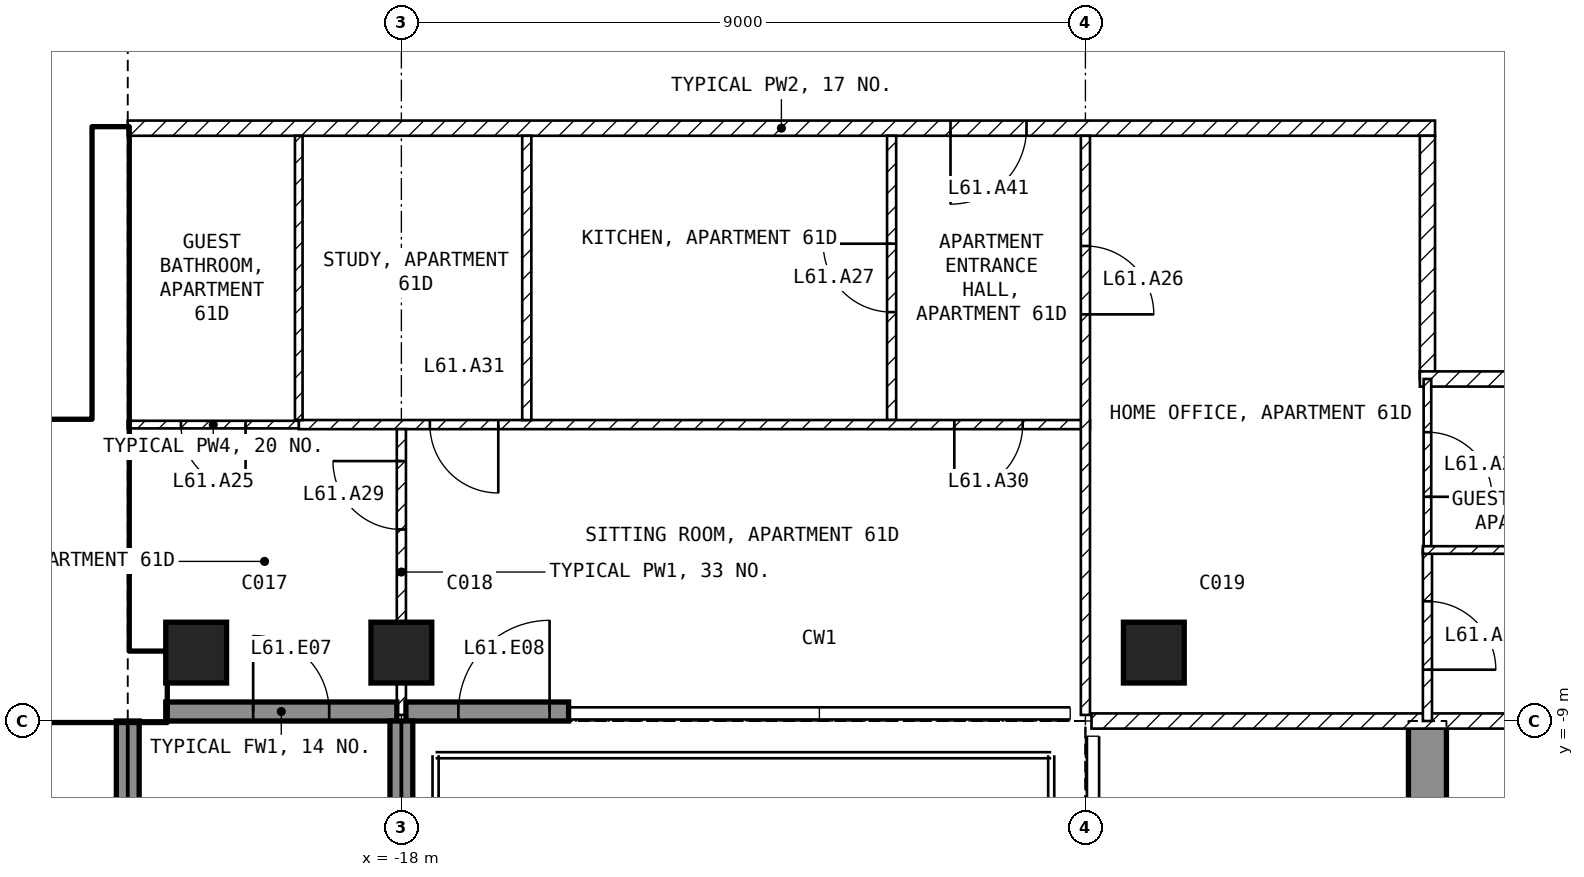
"""IFC4 building model, lengths in metres.
Left out: names, types, materials, properties, quantities, classifications, styles, units other than length and angle.
Written with IfcOpenShell. Run it as: python <this file> out.ifc"""

import sys

from ifc_helpers import new_model, si_unit, direction, frame, frame_2d, origin, origin_2d, place, context, subcontext, project, spatial, polyline, rectangle, outline, extrude, element, fill, save


model = new_model("IFC4")
c1 = context("Model", 3, precision=1e-05, world=origin(), true_north=direction((0.0, 1.0)))
c2 = subcontext(c1, "Body", "Model", "MODEL_VIEW")
j1 = project(units=[si_unit("LENGTHUNIT", "METRE"), si_unit("PLANEANGLEUNIT", "RADIAN")], contexts=[c1])
p1 = place(None, origin())
s1 = spatial("IfcSite", under=j1, at=p1, CompositionType="ELEMENT")
p2 = place(p1, origin())
s2 = spatial("IfcBuilding", under=s1, at=p2, CompositionType="ELEMENT")
p3 = place(p2, frame((0.0, 0.0, 243.0)))
s3 = spatial("IfcBuildingStorey", under=s2, at=p3, CompositionType="ELEMENT", Elevation=243.0)
for number, where, z_axis, x_axis in (
    (1, (-20.7, -8.1, -0.25), (0.0, 0.0, 1.0), (1.0, 0.0, 0.0)),
    (2, (-18.0, -8.1, -0.25), (0.0, 0.0, 1.0), (1.0, 0.0, 0.0)),
    (3, (-8.1, -8.1, -0.25), (0.0, 0.0, 1.0), (1.0, 0.0, 0.0)),
):
    element("IfcColumn", number, at=place(p3, frame(where, z_axis=z_axis, x_axis=x_axis)), inside=s3, PredefinedType="COLUMN", context=c2, shape_type="SweptSolid", body=[
        extrude(rectangle(XDim=0.8, YDim=0.8, at=origin_2d()), origin(), (0.0, 0.0, 1.0), 3.5),
    ])
p4 = place(p3, frame((-4.75, -16.7, -0.25), z_axis=(1.0, 0.0, 0.0), x_axis=(0.0, 1.0, 0.0)))
e4 = element("IfcWall", 4, at=p4, inside=s3, PredefinedType="SHEAR", context=c2, shape_type="SweptSolid", body=[
    extrude(outline(polyline([(0.0, 0.0), (3.2, 0.0), (3.2, 2.65), (5.6, 2.65), (5.6, 0.0), (7.7, 0.0), (7.7, 3.5), (0.0, 3.5), (0.0, 0.0)])), origin(), (0.0, 0.0, 1.0), 0.5),
])
p5 = place(p3, frame((-21.1, -8.875, 0.0), z_axis=(0.0, 0.0, 1.0), x_axis=(1.0, 0.0, 0.0)))
e5 = element("IfcWall", 5, at=p5, inside=s3, PredefinedType="SOLIDWALL", context=c2, shape_type="SweptSolid", body=[
    extrude(rectangle(XDim=3.04, YDim=0.25, at=frame_2d((1.52, 0.0))), origin(), (0.0, 0.0, 1.0), 3.25),
])
p6 = place(p5, frame((1.15, 0.0, 0.0)))
e6 = element("IfcOpeningElement", 6, at=p6, cuts=e5, PredefinedType="OPENING", context=c2, shape_type="SweptSolid", body=[
    extrude(rectangle(XDim=1.0, YDim=2.4, at=frame_2d((0.5, 1.2))), frame((0.0, 0.135, 0.0), z_axis=(0.0, -1.0, 0.0), x_axis=(1.0, 0.0, 0.0)), (0.0, 0.0, 1.0), 0.27),
])
p7 = place(p3, frame((-17.94, -8.875, 0.0), z_axis=(0.0, 0.0, 1.0), x_axis=(1.0, 0.0, 0.0)))
e7 = element("IfcWall", 7, at=p7, inside=s3, PredefinedType="SOLIDWALL", context=c2, shape_type="SweptSolid", body=[
    extrude(rectangle(XDim=2.14, YDim=0.25, at=frame_2d((1.07, 0.0))), origin(), (0.0, 0.0, 1.0), 3.25),
])
p8 = place(p7, frame((0.69, 0.0, 0.0)))
e8 = element("IfcOpeningElement", 8, at=p8, cuts=e7, PredefinedType="OPENING", context=c2, shape_type="SweptSolid", body=[
    extrude(rectangle(XDim=1.2, YDim=2.4, at=frame_2d((0.6, 1.2))), frame((0.0, 0.135, 0.0), z_axis=(0.0, -1.0, 0.0), x_axis=(1.0, 0.0, 0.0)), (0.0, 0.0, 1.0), 0.27),
])
p9 = place(p3, frame((-21.6, -9.0, 0.0), z_axis=(0.0, 0.0, 1.0), x_axis=(0.0, -1.0, 0.0)))
e9 = element("IfcWall", 9, at=p9, inside=s3, PredefinedType="SOLIDWALL", context=c2, shape_type="SweptSolid", body=[
    extrude(rectangle(XDim=2.7, YDim=0.3, at=frame_2d((1.35, 0.0))), origin(), (0.0, 0.0, 1.0), 3.25),
])
p10 = place(p3, frame((-18.0, -9.0, 0.0), z_axis=(0.0, 0.0, 1.0), x_axis=(0.0, -1.0, 0.0)))
e10 = element("IfcWall", 10, at=p10, inside=s3, PredefinedType="SOLIDWALL", context=c2, shape_type="SweptSolid", body=[
    extrude(rectangle(XDim=2.74, YDim=0.3, at=frame_2d((1.37, 0.0))), origin(), (0.0, 0.0, 1.0), 3.25),
])
p11 = place(p3, frame((-30.2, -8.55, 0.0), z_axis=(0.0, 0.0, 1.0), x_axis=(1.0, 0.0, 0.0)))
e11 = element("IfcWall", 11, at=p11, inside=s3, PredefinedType="SHEAR", context=c2, shape_type="SweptSolid", body=[
    extrude(rectangle(XDim=9.1, YDim=0.9, at=frame_2d((4.55, 0.0))), origin(), (0.0, 0.0, 1.0), 3.25),
])
p12 = place(p3, frame((-21.825, -8.1, 0.0), z_axis=(0.0, 0.0, 1.0), x_axis=(0.0, 1.0, 0.0)))
e12 = element("IfcWall", 12, at=p12, inside=s3, PredefinedType="SHEAR", context=c2, shape_type="SweptSolid", body=[
    extrude(rectangle(XDim=6.9, YDim=0.45, at=frame_2d((3.45, 0.0))), origin(), (0.0, 0.0, 1.0), 3.25),
])
p13 = place(p3, frame((-28.35, -5.15, 0.0), z_axis=(0.0, 0.0, 1.0), x_axis=(1.0, 0.0, 0.0)))
e13 = element("IfcWall", 13, at=p13, inside=s3, PredefinedType="SOLIDWALL", context=c2, shape_type="SweptSolid", body=[
    extrude(rectangle(XDim=6.3, YDim=0.2, at=frame_2d((3.15, 0.0))), origin(), (0.0, 0.0, 1.0), 3.25),
])
p14 = place(p13, frame((5.1, 0.0, 0.0)))
e14 = element("IfcOpeningElement", 14, at=p14, cuts=e13, PredefinedType="OPENING", context=c2, shape_type="SweptSolid", body=[
    extrude(rectangle(XDim=1.0, YDim=2.1, at=frame_2d((0.5, 1.05))), frame((0.0, 0.11, 0.0), z_axis=(0.0, -1.0, 0.0), x_axis=(1.0, 0.0, 0.0)), (0.0, 0.0, 1.0), 0.22),
])
p15 = place(p3, frame((-4.4, -1.2, 0.0), z_axis=(0.0, 0.0, 1.0), x_axis=(-1.0, 0.0, 0.0)))
e15 = element("IfcWall", 15, at=p15, inside=s3, PredefinedType="PARTITIONING", context=c2, shape_type="SweptSolid", body=[
    extrude(rectangle(XDim=17.2, YDim=0.2, at=frame_2d((8.6, 0.0))), origin(), (0.0, 0.0, 1.0), 3.25),
])
p16 = place(p15, frame((5.375, 0.0, 0.0)))
e16 = element("IfcOpeningElement", 16, at=p16, cuts=e15, PredefinedType="OPENING", context=c2, shape_type="SweptSolid", body=[
    extrude(rectangle(XDim=1.0, YDim=2.1, at=frame_2d((0.5, 1.05))), frame((0.0, 0.11, 0.0), z_axis=(0.0, -1.0, 0.0), x_axis=(1.0, 0.0, 0.0)), (0.0, 0.0, 1.0), 0.22),
])
p17 = place(p3, frame((-4.5, -4.5, 0.0), z_axis=(0.0, 0.0, 1.0), x_axis=(0.0, 1.0, 0.0)))
e17 = element("IfcWall", 17, at=p17, inside=s3, PredefinedType="PARTITIONING", context=c2, shape_type="SweptSolid", body=[
    extrude(rectangle(XDim=3.2, YDim=0.2, at=frame_2d((1.6, 0.0))), origin(), (0.0, 0.0, 1.0), 3.25),
])
p18 = place(p3, frame((-1.1, -4.5, 0.0), z_axis=(0.0, 0.0, 1.0), x_axis=(-1.0, 0.0, 0.0)))
e18 = element("IfcWall", 18, at=p18, inside=s3, PredefinedType="PARTITIONING", context=c2, shape_type="SweptSolid", body=[
    extrude(rectangle(XDim=3.5, YDim=0.2, at=frame_2d((1.75, 0.0))), origin(), (0.0, 0.0, 1.0), 3.25),
])
p19 = place(p3, frame((8.92, -9.0, 0.0), z_axis=(0.0, 0.0, 1.0), x_axis=(-1.0, 0.0, 0.0)))
e19 = element("IfcWall", 19, at=p19, inside=s3, PredefinedType="PARTITIONING", context=c2, shape_type="SweptSolid", body=[
    extrude(rectangle(XDim=17.84, YDim=0.2, at=frame_2d((8.92, 0.0))), origin(), (0.0, 0.0, 1.0), 3.25),
])
p20 = place(p19, frame((8.42, 0.0, 0.0)))
e20 = element("IfcOpeningElement", 20, at=p20, cuts=e19, PredefinedType="OPENING", context=c2, shape_type="SweptSolid", body=[
    extrude(rectangle(XDim=1.0, YDim=2.1, at=frame_2d((0.5, 1.05))), frame((0.0, 0.11, 0.0), z_axis=(0.0, -1.0, 0.0), x_axis=(1.0, 0.0, 0.0)), (0.0, 0.0, 1.0), 0.22),
])
p21 = place(p3, frame((-11.55, -5.04, 0.0), z_axis=(0.0, 0.0, 1.0), x_axis=(0.0, 1.0, 0.0)))
e21 = element("IfcWall", 21, at=p21, inside=s3, PredefinedType="PARTITIONING", context=c2, shape_type="SweptSolid", body=[
    extrude(rectangle(XDim=3.74, YDim=0.12, at=frame_2d((1.87, 0.0))), origin(), (0.0, 0.0, 1.0), 3.25),
])
p22 = place(p21, frame((1.42, 0.0, 0.0)))
e22 = element("IfcOpeningElement", 22, at=p22, cuts=e21, PredefinedType="OPENING", context=c2, shape_type="SweptSolid", body=[
    extrude(rectangle(XDim=0.9, YDim=2.1, at=frame_2d((0.45, 1.05))), frame((0.0, 0.07, 0.0), z_axis=(0.0, -1.0, 0.0), x_axis=(1.0, 0.0, 0.0)), (0.0, 0.0, 1.0), 0.14),
])
p23 = place(p3, frame((-8.94, -5.1, 0.0), z_axis=(0.0, 0.0, 1.0), x_axis=(-1.0, 0.0, 0.0)))
e23 = element("IfcWall", 23, at=p23, inside=s3, PredefinedType="PARTITIONING", context=c2, shape_type="SweptSolid", body=[
    extrude(rectangle(XDim=10.41, YDim=0.12, at=frame_2d((5.205, 0.0))), origin(), (0.0, 0.0, 1.0), 3.25),
])
p24 = place(p23, frame((0.885, 0.0, 0.0)))
e24 = element("IfcOpeningElement", 24, at=p24, cuts=e23, PredefinedType="OPENING", context=c2, shape_type="SweptSolid", body=[
    extrude(rectangle(XDim=0.9, YDim=2.1, at=frame_2d((0.45, 1.05))), frame((0.0, 0.07, 0.0), z_axis=(0.0, -1.0, 0.0), x_axis=(1.0, 0.0, 0.0)), (0.0, 0.0, 1.0), 0.14),
])
p25 = place(p23, frame((7.785, 0.0, 0.0)))
e25 = element("IfcOpeningElement", 25, at=p25, cuts=e23, PredefinedType="OPENING", context=c2, shape_type="SweptSolid", body=[
    extrude(rectangle(XDim=0.9, YDim=2.1, at=frame_2d((0.45, 1.05))), frame((0.0, 0.07, 0.0), z_axis=(0.0, -1.0, 0.0), x_axis=(1.0, 0.0, 0.0)), (0.0, 0.0, 1.0), 0.14),
])
p26 = place(p3, frame((-9.0, -1.3, 0.0), z_axis=(0.0, 0.0, 1.0), x_axis=(0.0, -1.0, 0.0)))
e26 = element("IfcWall", 26, at=p26, inside=s3, PredefinedType="PARTITIONING", context=c2, shape_type="SweptSolid", body=[
    extrude(rectangle(XDim=7.62, YDim=0.12, at=frame_2d((3.81, 0.0))), origin(), (0.0, 0.0, 1.0), 3.25),
])
p27 = place(p26, frame((1.45, 0.0, 0.0)))
e27 = element("IfcOpeningElement", 27, at=p27, cuts=e26, PredefinedType="OPENING", context=c2, shape_type="SweptSolid", body=[
    extrude(rectangle(XDim=0.9, YDim=2.1, at=frame_2d((0.45, 1.05))), frame((0.0, 0.07, 0.0), z_axis=(0.0, -1.0, 0.0), x_axis=(1.0, 0.0, 0.0)), (0.0, 0.0, 1.0), 0.14),
])
p28 = place(p3, frame((-16.35, -5.04, 0.0), z_axis=(0.0, 0.0, 1.0), x_axis=(0.0, 1.0, 0.0)))
e28 = element("IfcWall", 28, at=p28, inside=s3, PredefinedType="PARTITIONING", context=c2, shape_type="SweptSolid", body=[
    extrude(rectangle(XDim=3.74, YDim=0.12, at=frame_2d((1.87, 0.0))), origin(), (0.0, 0.0, 1.0), 3.25),
])
p29 = place(p3, frame((-19.35, -5.04, 0.0), z_axis=(0.0, 0.0, 1.0), x_axis=(0.0, 1.0, 0.0)))
e29 = element("IfcWall", 29, at=p29, inside=s3, PredefinedType="PARTITIONING", context=c2, shape_type="SweptSolid", body=[
    extrude(rectangle(XDim=3.74, YDim=0.1, at=frame_2d((1.87, 0.0))), origin(), (0.0, 0.0, 1.0), 3.25),
])
p30 = place(p3, frame((-19.35, -5.1, 0.0), z_axis=(0.0, 0.0, 1.0), x_axis=(-1.0, 0.0, 0.0)))
e30 = element("IfcWall", 30, at=p30, inside=s3, PredefinedType="PARTITIONING", context=c2, shape_type="SweptSolid", body=[
    extrude(rectangle(XDim=2.25, YDim=0.1, at=frame_2d((1.125, 0.0))), origin(), (0.0, 0.0, 1.0), 3.25),
])
p31 = place(p30, frame((0.7, 0.0, 0.0)))
e31 = element("IfcOpeningElement", 31, at=p31, cuts=e30, PredefinedType="OPENING", context=c2, shape_type="SweptSolid", body=[
    extrude(rectangle(XDim=0.85, YDim=2.1, at=frame_2d((0.425, 1.05))), frame((0.0, 0.06, 0.0), z_axis=(0.0, -1.0, 0.0), x_axis=(1.0, 0.0, 0.0)), (0.0, 0.0, 1.0), 0.12),
])
p32 = place(p3, frame((-18.0, -8.92, 0.0), z_axis=(0.0, 0.0, 1.0), x_axis=(0.0, 1.0, 0.0)))
e32 = element("IfcWall", 32, at=p32, inside=s3, PredefinedType="PARTITIONING", context=c2, shape_type="SweptSolid", body=[
    extrude(rectangle(XDim=3.76, YDim=0.12, at=frame_2d((1.88, 0.0))), origin(), (0.0, 0.0, 1.0), 2.496),
])
p33 = place(p32, frame((2.44, 0.0, 0.0)))
e33 = element("IfcOpeningElement", 33, at=p33, cuts=e32, PredefinedType="OPENING", context=c2, shape_type="SweptSolid", body=[
    extrude(rectangle(XDim=0.9, YDim=2.1, at=frame_2d((0.45, 1.05))), frame((0.0, 0.07, 0.0), z_axis=(0.0, -1.0, 0.0), x_axis=(1.0, 0.0, 0.0)), (0.0, 0.0, 1.0), 0.14),
])
p34 = place(p3, frame((-4.5, -4.5, 0.0), z_axis=(0.0, 0.0, 1.0), x_axis=(0.0, -1.0, 0.0)))
e34 = element("IfcWall", 34, at=p34, inside=s3, PredefinedType="PARTITIONING", context=c2, shape_type="SweptSolid", body=[
    extrude(rectangle(XDim=2.25, YDim=0.1, at=frame_2d((1.125, 0.0))), origin(), (0.0, 0.0, 1.0), 3.25),
])
p35 = place(p34, frame((0.7, 0.0, 0.0)))
e35 = element("IfcOpeningElement", 35, at=p35, cuts=e34, PredefinedType="OPENING", context=c2, shape_type="SweptSolid", body=[
    extrude(rectangle(XDim=0.85, YDim=2.1, at=frame_2d((0.425, 1.05))), frame((0.0, 0.06, 0.0), z_axis=(0.0, -1.0, 0.0), x_axis=(1.0, 0.0, 0.0)), (0.0, 0.0, 1.0), 0.12),
])
p36 = place(p3, frame((-4.5, -6.75, 0.0), z_axis=(0.0, 0.0, 1.0), x_axis=(0.0, -1.0, 0.0)))
e36 = element("IfcWall", 36, at=p36, inside=s3, PredefinedType="PARTITIONING", context=c2, shape_type="SweptSolid", body=[
    extrude(rectangle(XDim=2.25, YDim=0.12, at=frame_2d((1.125, 0.0))), origin(), (0.0, 0.0, 1.0), 3.25),
])
p37 = place(p36, frame((0.675, 0.0, 0.0)))
e37 = element("IfcOpeningElement", 37, at=p37, cuts=e36, PredefinedType="OPENING", context=c2, shape_type="SweptSolid", body=[
    extrude(rectangle(XDim=0.9, YDim=2.1, at=frame_2d((0.45, 1.05))), frame((0.0, 0.07, 0.0), z_axis=(0.0, -1.0, 0.0), x_axis=(1.0, 0.0, 0.0)), (0.0, 0.0, 1.0), 0.14),
])
p38 = place(p3, frame((-1.1, -6.75, 0.0), z_axis=(0.0, 0.0, 1.0), x_axis=(-1.0, 0.0, 0.0)))
e38 = element("IfcWall", 38, at=p38, inside=s3, PredefinedType="PARTITIONING", context=c2, shape_type="SweptSolid", body=[
    extrude(rectangle(XDim=3.46, YDim=0.1, at=frame_2d((1.73, 0.0))), origin(), (0.0, 0.0, 1.0), 3.25),
])
p39 = place(p6, origin())
e39 = element("IfcDoor", 39, at=p39, inside=s3, OperationType="SINGLE_SWING_LEFT", PredefinedType="DOOR", context=c2, shape_type="SweptSolid", body=[
    extrude(rectangle(XDim=1.0, YDim=2.4, at=frame_2d((0.5, 1.2))), frame((0.0, 0.025, 0.0), z_axis=(0.0, -1.0, 0.0), x_axis=(1.0, 0.0, 0.0)), (0.0, 0.0, 1.0), 0.05),
])
fill(e6, e39)
p40 = place(p8, origin())
e40 = element("IfcDoor", 40, at=p40, inside=s3, OperationType="SINGLE_SWING_RIGHT", PredefinedType="DOOR", context=c2, shape_type="SweptSolid", body=[
    extrude(rectangle(XDim=1.2, YDim=2.4, at=frame_2d((0.6, 1.2))), frame((0.0, 0.025, 0.0), z_axis=(0.0, -1.0, 0.0), x_axis=(1.0, 0.0, 0.0)), (0.0, 0.0, 1.0), 0.05),
])
fill(e8, e40)
p41 = place(p14, origin())
e41 = element("IfcDoor", 41, at=p41, inside=s3, OperationType="SINGLE_SWING_LEFT", PredefinedType="DOOR", context=c2, shape_type="SweptSolid", body=[
    extrude(rectangle(XDim=1.0, YDim=2.1, at=frame_2d((0.5, 1.05))), frame((0.0, 0.025, 0.0), z_axis=(0.0, -1.0, 0.0), x_axis=(1.0, 0.0, 0.0)), (0.0, 0.0, 1.0), 0.05),
])
fill(e14, e41)
p42 = place(p35, origin())
e42 = element("IfcDoor", 42, at=p42, inside=s3, OperationType="SINGLE_SWING_RIGHT", PredefinedType="DOOR", context=c2, shape_type="SweptSolid", body=[
    extrude(rectangle(XDim=0.85, YDim=2.1, at=frame_2d((0.425, 1.05))), frame((0.0, 0.025, 0.0), z_axis=(0.0, -1.0, 0.0), x_axis=(1.0, 0.0, 0.0)), (0.0, 0.0, 1.0), 0.05),
])
fill(e35, e42)
p43 = place(p31, origin())
e43 = element("IfcDoor", 43, at=p43, inside=s3, OperationType="SINGLE_SWING_LEFT", PredefinedType="DOOR", context=c2, shape_type="SweptSolid", body=[
    extrude(rectangle(XDim=0.85, YDim=2.1, at=frame_2d((0.425, 1.05))), frame((0.0, 0.025, 0.0), z_axis=(0.0, -1.0, 0.0), x_axis=(1.0, 0.0, 0.0)), (0.0, 0.0, 1.0), 0.05),
])
fill(e31, e43)
p44 = place(p27, origin())
e44 = element("IfcDoor", 44, at=p44, inside=s3, OperationType="SINGLE_SWING_RIGHT", PredefinedType="DOOR", context=c2, shape_type="SweptSolid", body=[
    extrude(rectangle(XDim=0.9, YDim=2.1, at=frame_2d((0.45, 1.05))), frame((0.0, 0.025, 0.0), z_axis=(0.0, -1.0, 0.0), x_axis=(1.0, 0.0, 0.0)), (0.0, 0.0, 1.0), 0.05),
])
fill(e27, e44)
p45 = place(p22, origin())
e45 = element("IfcDoor", 45, at=p45, inside=s3, OperationType="SINGLE_SWING_RIGHT", PredefinedType="DOOR", context=c2, shape_type="SweptSolid", body=[
    extrude(rectangle(XDim=0.9, YDim=2.1, at=frame_2d((0.45, 1.05))), frame((0.0, 0.025, 0.0), z_axis=(0.0, -1.0, 0.0), x_axis=(1.0, 0.0, 0.0)), (0.0, 0.0, 1.0), 0.05),
])
fill(e22, e45)
p46 = place(p37, origin())
e46 = element("IfcDoor", 46, at=p46, inside=s3, OperationType="SINGLE_SWING_RIGHT", PredefinedType="DOOR", context=c2, shape_type="SweptSolid", body=[
    extrude(rectangle(XDim=0.9, YDim=2.1, at=frame_2d((0.45, 1.05))), frame((0.0, 0.025, 0.0), z_axis=(0.0, -1.0, 0.0), x_axis=(1.0, 0.0, 0.0)), (0.0, 0.0, 1.0), 0.05),
])
fill(e37, e46)
p47 = place(p33, origin())
e47 = element("IfcDoor", 47, at=p47, inside=s3, OperationType="SINGLE_SWING_RIGHT", PredefinedType="DOOR", context=c2, shape_type="SweptSolid", body=[
    extrude(rectangle(XDim=0.9, YDim=2.1, at=frame_2d((0.45, 1.05))), frame((0.0, 0.025, 0.0), z_axis=(0.0, -1.0, 0.0), x_axis=(1.0, 0.0, 0.0)), (0.0, 0.0, 1.0), 0.05),
])
fill(e33, e47)
p48 = place(p24, origin())
e48 = element("IfcDoor", 48, at=p48, inside=s3, OperationType="SINGLE_SWING_RIGHT", PredefinedType="DOOR", context=c2, shape_type="SweptSolid", body=[
    extrude(rectangle(XDim=0.9, YDim=2.1, at=frame_2d((0.45, 1.05))), frame((0.0, 0.025, 0.0), z_axis=(0.0, -1.0, 0.0), x_axis=(1.0, 0.0, 0.0)), (0.0, 0.0, 1.0), 0.05),
])
fill(e24, e48)
p49 = place(p25, origin())
e49 = element("IfcDoor", 49, at=p49, inside=s3, OperationType="SINGLE_SWING_LEFT", PredefinedType="DOOR", context=c2, shape_type="SweptSolid", body=[
    extrude(rectangle(XDim=0.9, YDim=2.1, at=frame_2d((0.45, 1.05))), frame((0.0, 0.025, 0.0), z_axis=(0.0, -1.0, 0.0), x_axis=(1.0, 0.0, 0.0)), (0.0, 0.0, 1.0), 0.05),
])
fill(e25, e49)
p50 = place(p16, origin())
e50 = element("IfcDoor", 50, at=p50, inside=s3, OperationType="SINGLE_SWING_RIGHT", PredefinedType="DOOR", context=c2, shape_type="SweptSolid", body=[
    extrude(rectangle(XDim=1.0, YDim=2.1, at=frame_2d((0.5, 1.05))), frame((0.0, 0.025, 0.0), z_axis=(0.0, -1.0, 0.0), x_axis=(1.0, 0.0, 0.0)), (0.0, 0.0, 1.0), 0.05),
])
fill(e16, e50)
save(model, sys.argv[1])
